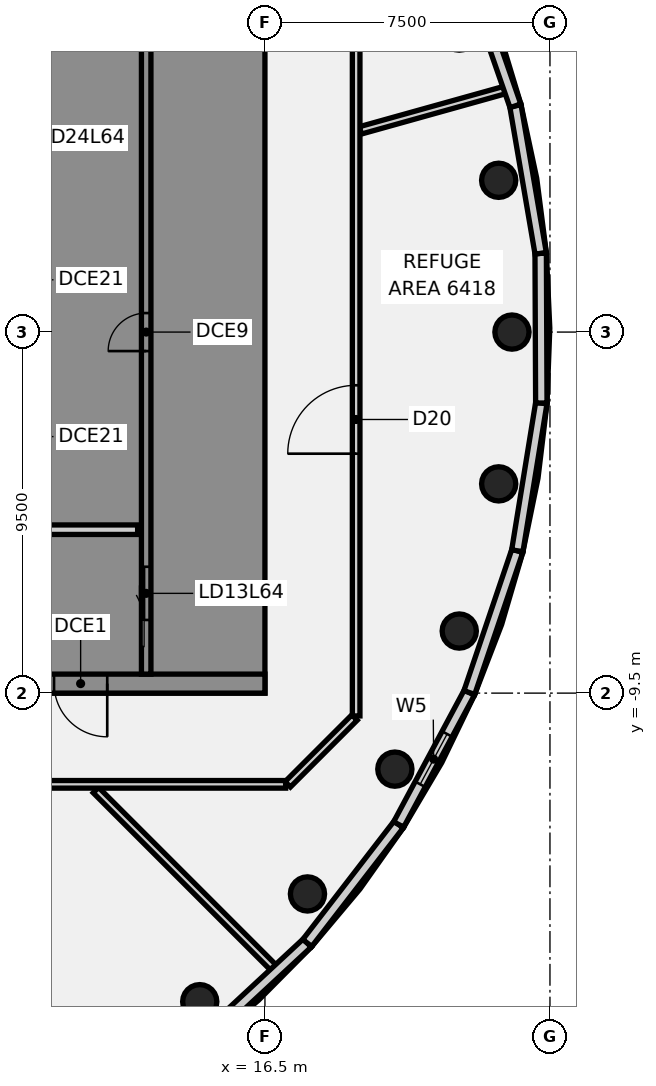
"""IFC4 building model, lengths in metres.
Left out: names, types, materials, properties, quantities, classifications, styles, units other than length and angle.
Written with IfcOpenShell. Run it as: python <this file> out.ifc"""

import sys

from ifc_helpers import new_model, si_unit, direction, frame, frame_2d, origin, origin_2d, place, context, subcontext, project, spatial, polyline, rectangle, circle, outline, extrude, element, fill, save


model = new_model("IFC4")
c1 = context("Model", 3, precision=1e-05, world=origin(), true_north=direction((0.0, 1.0)))
c2 = subcontext(c1, "Body", "Model", "MODEL_VIEW")
j1 = project(units=[si_unit("LENGTHUNIT", "METRE"), si_unit("PLANEANGLEUNIT", "RADIAN")], contexts=[c1])
p1 = place(None, origin())
s1 = spatial("IfcSite", under=j1, at=p1, CompositionType="ELEMENT")
p2 = place(p1, origin())
s2 = spatial("IfcBuilding", under=s1, at=p2, CompositionType="ELEMENT")
p3 = place(p2, frame((0.0, 0.0, 252.3)))
s3 = spatial("IfcBuildingStorey", under=s2, at=p3, CompositionType="ELEMENT", Elevation=252.3)
for number, where, z_axis, x_axis in (
    (1, (23.0, 0.0, -0.18), (0.0, 0.0, 1.0), (1.0, 0.0, 0.0)),
    (2, (22.651, 3.994, -0.18), (0.0, 0.0, 1.0), (1.0, 0.0, 0.0)),
    (3, (14.784, -17.619, -0.18), (0.0, 0.0, 1.0), (1.0, 0.0, 0.0)),
    (4, (17.619, -14.784, -0.18), (0.0, 0.0, 1.0), (1.0, 0.0, 0.0)),
    (5, (19.919, -11.5, -0.18), (0.0, 0.0, 1.0), (1.0, 0.0, 0.0)),
    (6, (21.613, -7.866, -0.18), (0.0, 0.0, 1.0), (1.0, 0.0, 0.0)),
    (7, (22.651, -3.994, -0.18), (0.0, 0.0, 1.0), (1.0, 0.0, 0.0)),
):
    element("IfcColumn", number, at=place(p3, frame(where, z_axis=z_axis, x_axis=x_axis)), inside=s3, PredefinedType="COLUMN", context=c2, shape_type="SweptSolid", body=[
        extrude(circle(Radius=0.45, at=origin_2d()), origin(), (0.0, 0.0, 1.0), 4.54),
    ])
p4 = place(p3, frame((12.052, -12.052, 0.0), z_axis=(0.0, 0.0, 1.0), x_axis=(0.707106781187, -0.707106781187, 0.0)))
e8 = element("IfcWall", 8, at=p4, inside=s3, PredefinedType="PARTITIONING", context=c2, shape_type="SweptSolid", body=[
    extrude(rectangle(XDim=6.886, YDim=0.2, at=frame_2d((3.443, 0.0))), origin(), (0.0, 0.0, 1.0), 3.66),
])
p5 = place(p3, frame((-17.1, -11.9, 0.0), z_axis=(0.0, 0.0, 1.0), x_axis=(1.0, 0.0, 0.0)))
e9 = element("IfcWall", 9, at=p5, inside=s3, PredefinedType="PARTITIONING", context=c2, shape_type="SweptSolid", body=[
    extrude(rectangle(XDim=34.145, YDim=0.2, at=frame_2d((17.073, 0.0))), origin(), (0.0, 0.0, 1.0), 3.66),
])
p6 = place(p5, frame((16.15, 0.0, 0.0)))
e10 = element("IfcOpeningElement", 10, at=p6, cuts=e9, PredefinedType="OPENING", context=c2, shape_type="SweptSolid", body=[
    extrude(rectangle(XDim=1.8, YDim=2.1, at=frame_2d((0.9, 1.05))), frame((0.0, 0.11, 0.0), z_axis=(0.0, -1.0, 0.0), x_axis=(1.0, 0.0, 0.0)), (0.0, 0.0, 1.0), 0.22),
])
p7 = place(p5, frame((7.45, 0.0, 0.0)))
e11 = element("IfcOpeningElement", 11, at=p7, cuts=e9, PredefinedType="OPENING", context=c2, shape_type="SweptSolid", body=[
    extrude(rectangle(XDim=1.8, YDim=2.1, at=frame_2d((0.9, 1.05))), frame((0.0, 0.11, 0.0), z_axis=(0.0, -1.0, 0.0), x_axis=(1.0, 0.0, 0.0)), (0.0, 0.0, 1.0), 0.22),
])
p8 = place(p5, frame((2.1, 0.0, 0.0)))
e12 = element("IfcOpeningElement", 12, at=p8, cuts=e9, PredefinedType="OPENING", context=c2, shape_type="SweptSolid", body=[
    extrude(rectangle(XDim=1.8, YDim=2.1, at=frame_2d((0.9, 1.05))), frame((0.0, 0.11, 0.0), z_axis=(0.0, -1.0, 0.0), x_axis=(1.0, 0.0, 0.0)), (0.0, 0.0, 1.0), 0.22),
])
p9 = place(p3, frame((19.011, 5.307, 0.0), z_axis=(0.0, 0.0, 1.0), x_axis=(0.963121770568, 0.269065893524, 0.0)))
e13 = element("IfcWall", 13, at=p9, inside=s3, PredefinedType="PARTITIONING", context=c2, shape_type="SweptSolid", body=[
    extrude(rectangle(XDim=4.223, YDim=0.2, at=frame_2d((2.111, 0.0))), origin(), (0.0, 0.0, 1.0), 3.66),
])
p10 = place(p3, frame((17.1, -11.9, 0.0), z_axis=(0.0, 0.0, 1.0), x_axis=(0.707106781187, 0.707106781187, 0.0)))
e14 = element("IfcWall", 14, at=p10, inside=s3, PredefinedType="PARTITIONING", context=c2, shape_type="SweptSolid", body=[
    extrude(rectangle(XDim=2.486, YDim=0.2, at=frame_2d((1.243, 0.0))), origin(), (0.0, 0.0, 1.0), 3.66),
])
p11 = place(p3, frame((18.9, -10.1, 0.0), z_axis=(0.0, 0.0, 1.0), x_axis=(0.0, 1.0, 0.0)))
e15 = element("IfcWall", 15, at=p11, inside=s3, PredefinedType="PARTITIONING", context=c2, shape_type="SweptSolid", body=[
    extrude(rectangle(XDim=20.2, YDim=0.2, at=frame_2d((10.1, 0.0))), origin(), (0.0, 0.0, 1.0), 3.66),
])
p12 = place(p11, frame((6.9, 0.0, 0.0)))
e16 = element("IfcOpeningElement", 16, at=p12, cuts=e15, PredefinedType="OPENING", context=c2, shape_type="SweptSolid", body=[
    extrude(rectangle(XDim=1.8, YDim=2.1, at=frame_2d((0.9, 1.05))), frame((0.0, 0.11, 0.0), z_axis=(0.0, -1.0, 0.0), x_axis=(1.0, 0.0, 0.0)), (0.0, 0.0, 1.0), 0.22),
])
p13 = place(p3, frame((14.727, -18.754, 0.0), z_axis=(0.0, 0.0, 1.0), x_axis=(0.732813362883, 0.680429698926, 0.0)))
e17 = element("IfcWall", 17, at=p13, inside=s3, PredefinedType="SOLIDWALL", context=c2, shape_type="SweptSolid", body=[
    extrude(rectangle(XDim=3.938, YDim=0.3, at=frame_2d((1.969, 0.0))), origin(), (0.0, 0.0, 1.0), 4.36),
])
p14 = place(p3, frame((17.613, -16.075, 0.0), z_axis=(0.0, 0.0, 1.0), x_axis=(0.610785688376, 0.79179596038, 0.0)))
e18 = element("IfcWall", 18, at=p14, inside=s3, PredefinedType="SOLIDWALL", context=c2, shape_type="SweptSolid", body=[
    extrude(rectangle(XDim=3.938, YDim=0.3, at=frame_2d((1.969, 0.0))), origin(), (0.0, 0.0, 1.0), 4.36),
])
p15 = place(p3, frame((20.019, -12.956, 0.0), z_axis=(0.0, 0.0, 1.0), x_axis=(0.472180126088, 0.881502086513, 0.0)))
e19 = element("IfcWall", 19, at=p15, inside=s3, PredefinedType="SOLIDWALL", context=c2, shape_type="SweptSolid", body=[
    extrude(rectangle(XDim=3.938, YDim=0.3, at=frame_2d((1.969, 0.0))), origin(), (0.0, 0.0, 1.0), 4.36),
])
p16 = place(p15, frame((1.2, 0.0, 1.4)))
e20 = element("IfcOpeningElement", 20, at=p16, cuts=e19, PredefinedType="OPENING", context=c2, shape_type="SweptSolid", body=[
    extrude(rectangle(XDim=1.5, YDim=1.0, at=frame_2d((0.75, 0.5))), frame((0.0, 0.16, 0.0), z_axis=(0.0, -1.0, 0.0), x_axis=(1.0, 0.0, 0.0)), (0.0, 0.0, 1.0), 0.32),
])
p17 = place(p3, frame((21.878, -9.485, 0.0), z_axis=(0.0, 0.0, 1.0), x_axis=(0.320613287718, 0.947210177172, 0.0)))
e21 = element("IfcWall", 21, at=p17, inside=s3, PredefinedType="SOLIDWALL", context=c2, shape_type="SweptSolid", body=[
    extrude(rectangle(XDim=3.938, YDim=0.3, at=frame_2d((1.969, 0.0))), origin(), (0.0, 0.0, 1.0), 4.36),
])
p18 = place(p3, frame((23.141, -5.754, 0.0), z_axis=(0.0, 0.0, 1.0), x_axis=(0.160376439891, 0.987055924215, 0.0)))
e22 = element("IfcWall", 22, at=p18, inside=s3, PredefinedType="SOLIDWALL", context=c2, shape_type="SweptSolid", body=[
    extrude(rectangle(XDim=3.938, YDim=0.3, at=frame_2d((1.969, 0.0))), origin(), (0.0, 0.0, 1.0), 4.36),
])
p19 = place(p3, frame((23.773, -1.867, 0.0), z_axis=(0.0, 0.0, 1.0), x_axis=(-0.004339160737, 0.999990585798, 0.0)))
e23 = element("IfcWall", 23, at=p19, inside=s3, PredefinedType="SOLIDWALL", context=c2, shape_type="SweptSolid", body=[
    extrude(rectangle(XDim=3.938, YDim=0.3, at=frame_2d((1.969, 0.0))), origin(), (0.0, 0.0, 1.0), 4.36),
])
p20 = place(p3, frame((23.756, 2.072, 0.0), z_axis=(0.0, 0.0, 1.0), x_axis=(-0.168810670753, 0.985648495885, 0.0)))
e24 = element("IfcWall", 24, at=p20, inside=s3, PredefinedType="SOLIDWALL", context=c2, shape_type="SweptSolid", body=[
    extrude(rectangle(XDim=3.938, YDim=0.3, at=frame_2d((1.969, 0.0))), origin(), (0.0, 0.0, 1.0), 4.36),
])
p21 = place(p3, frame((23.091, 5.953, 0.0), z_axis=(0.0, 0.0, 1.0), x_axis=(-0.328789892836, 0.944403095277, 0.0)))
e25 = element("IfcWall", 25, at=p21, inside=s3, PredefinedType="SOLIDWALL", context=c2, shape_type="SweptSolid", body=[
    extrude(rectangle(XDim=3.938, YDim=0.3, at=frame_2d((1.969, 0.0))), origin(), (0.0, 0.0, 1.0), 4.36),
])
p22 = place(p3, frame((16.5, -9.25, 0.0), z_axis=(0.0, 0.0, 1.0), x_axis=(-1.0, 0.0, 0.0)))
e26 = element("IfcWall", 26, at=p22, inside=s3, PredefinedType="SHEAR", context=c2, shape_type="SweptSolid", body=[
    extrude(rectangle(XDim=13.0, YDim=0.5, at=frame_2d((6.5, 0.0))), origin(), (0.0, 0.0, 1.0), 4.36),
])
p23 = place(p22, frame((4.15, 0.0, 0.0)))
e27 = element("IfcOpeningElement", 27, at=p23, cuts=e26, PredefinedType="OPENING", context=c2, shape_type="SweptSolid", body=[
    extrude(rectangle(XDim=1.4, YDim=2.1, at=frame_2d((0.7, 1.05))), frame((0.0, 0.26, 0.0), z_axis=(0.0, -1.0, 0.0), x_axis=(1.0, 0.0, 0.0)), (0.0, 0.0, 1.0), 0.52),
])
p24 = place(p22, frame((10.125, 0.0, 0.0)))
e28 = element("IfcOpeningElement", 28, at=p24, cuts=e26, PredefinedType="OPENING", context=c2, shape_type="SweptSolid", body=[
    extrude(rectangle(XDim=1.4, YDim=2.1, at=frame_2d((0.7, 1.05))), frame((0.0, 0.26, 0.0), z_axis=(0.0, -1.0, 0.0), x_axis=(1.0, 0.0, 0.0)), (0.0, 0.0, 1.0), 0.52),
])
p25 = place(p3, origin())
e29 = element("IfcWall", 29, at=p25, inside=s3, PredefinedType="SHEAR", context=c2, shape_type="SweptSolid", body=[
    extrude(outline(polyline([(13.5, -8.125), (13.5, -9.0), (16.0, -9.0), (16.5, -9.0), (16.5, 9.0), (16.0, 9.0), (13.5, 9.0), (13.5, 8.125), (16.0, 8.125), (16.0, 5.625), (13.5, 5.625), (13.5, 5.375), (16.0, 5.375), (16.0, -5.375), (13.5, -5.375), (13.5, -5.625), (16.0, -5.625), (16.0, -8.125), (13.5, -8.125)])), origin(), (0.0, 0.0, 1.0), 4.36),
])
p26 = place(p3, frame((13.375, -9.0, 0.0), z_axis=(0.0, 0.0, 1.0), x_axis=(0.0, 1.0, 0.0)))
e30 = element("IfcWall", 30, at=p26, inside=s3, PredefinedType="SHEAR", context=c2, shape_type="SweptSolid", body=[
    extrude(rectangle(XDim=18.0, YDim=0.25, at=frame_2d((9.0, 0.0))), origin(), (0.0, 0.0, 1.0), 4.36),
])
p27 = place(p26, frame((1.425, 0.0, 0.0)))
e31 = element("IfcOpeningElement", 31, at=p27, cuts=e30, PredefinedType="OPENING", context=c2, shape_type="SweptSolid", body=[
    extrude(rectangle(XDim=1.4, YDim=2.1, at=frame_2d((0.7, 1.05))), frame((0.0, 0.135, 0.0), z_axis=(0.0, -1.0, 0.0), x_axis=(1.0, 0.0, 0.0)), (0.0, 0.0, 1.0), 0.27),
])
p28 = place(p26, frame((8.5, 0.0, 0.0)))
e32 = element("IfcOpeningElement", 32, at=p28, cuts=e30, PredefinedType="OPENING", context=c2, shape_type="SweptSolid", body=[
    extrude(rectangle(XDim=1.0, YDim=2.1, at=frame_2d((0.5, 1.05))), frame((0.0, 0.135, 0.0), z_axis=(0.0, -1.0, 0.0), x_axis=(1.0, 0.0, 0.0)), (0.0, 0.0, 1.0), 0.27),
])
p29 = place(p3, frame((13.15, -5.2, 0.0), z_axis=(0.0, 0.0, 1.0), x_axis=(-1.0, 0.0, 0.0)))
e33 = element("IfcWall", 33, at=p29, inside=s3, PredefinedType="PARTITIONING", context=c2, shape_type="SweptSolid", body=[
    extrude(rectangle(XDim=3.0, YDim=0.25, at=frame_2d((1.5, 0.0))), origin(), (0.0, 0.0, 1.0), 4.36),
])
p30 = place(p12, frame((1.8, 0.0, 0.0), z_axis=(0.0, 0.0, 1.0), x_axis=(-1.0, 0.0, 0.0)))
e34 = element("IfcDoor", 34, at=p30, inside=s3, OperationType="DOUBLE_DOOR_SINGLE_SWING", PredefinedType="DOOR", context=c2, shape_type="SweptSolid", body=[
    extrude(rectangle(XDim=1.8, YDim=2.1, at=frame_2d((0.9, 1.05))), frame((0.0, 0.025, 0.0), z_axis=(0.0, -1.0, 0.0), x_axis=(1.0, 0.0, 0.0)), (0.0, 0.0, 1.0), 0.05),
])
fill(e16, e34)
p31 = place(p16, origin())
e35 = element("IfcWindow", 35, at=p31, inside=s3, PartitioningType="SINGLE_PANEL", PredefinedType="WINDOW", context=c2, shape_type="SweptSolid", body=[
    extrude(rectangle(XDim=1.5, YDim=1.0, at=frame_2d((0.75, 0.5))), frame((0.0, 0.03, 0.0), z_axis=(0.0, -1.0, 0.0), x_axis=(1.0, 0.0, 0.0)), (0.0, 0.0, 1.0), 0.06),
])
fill(e20, e35)
p32 = place(p23, origin())
e36 = element("IfcDoor", 36, at=p32, inside=s3, OperationType="SINGLE_SWING_LEFT", PredefinedType="DOOR", context=c2, shape_type="SweptSolid", body=[
    extrude(rectangle(XDim=1.4, YDim=2.1, at=frame_2d((0.7, 1.05))), frame((0.0, 0.025, 0.0), z_axis=(0.0, -1.0, 0.0), x_axis=(1.0, 0.0, 0.0)), (0.0, 0.0, 1.0), 0.05),
])
fill(e27, e36)
p33 = place(p27, origin())
e37 = element("IfcDoor", 37, at=p33, inside=s3, OperationType="SLIDING_TO_LEFT", PredefinedType="DOOR", context=c2, shape_type="SweptSolid", body=[
    extrude(rectangle(XDim=1.4, YDim=2.1, at=frame_2d((0.7, 1.05))), frame((0.0, 0.025, 0.0), z_axis=(0.0, -1.0, 0.0), x_axis=(1.0, 0.0, 0.0)), (0.0, 0.0, 1.0), 0.05),
])
fill(e31, e37)
p34 = place(p28, origin())
e38 = element("IfcDoor", 38, at=p34, inside=s3, OperationType="SINGLE_SWING_LEFT", PredefinedType="DOOR", context=c2, shape_type="SweptSolid", body=[
    extrude(rectangle(XDim=1.0, YDim=2.1, at=frame_2d((0.5, 1.05))), frame((0.0, 0.025, 0.0), z_axis=(0.0, -1.0, 0.0), x_axis=(1.0, 0.0, 0.0)), (0.0, 0.0, 1.0), 0.05),
])
fill(e32, e38)
save(model, sys.argv[1])
